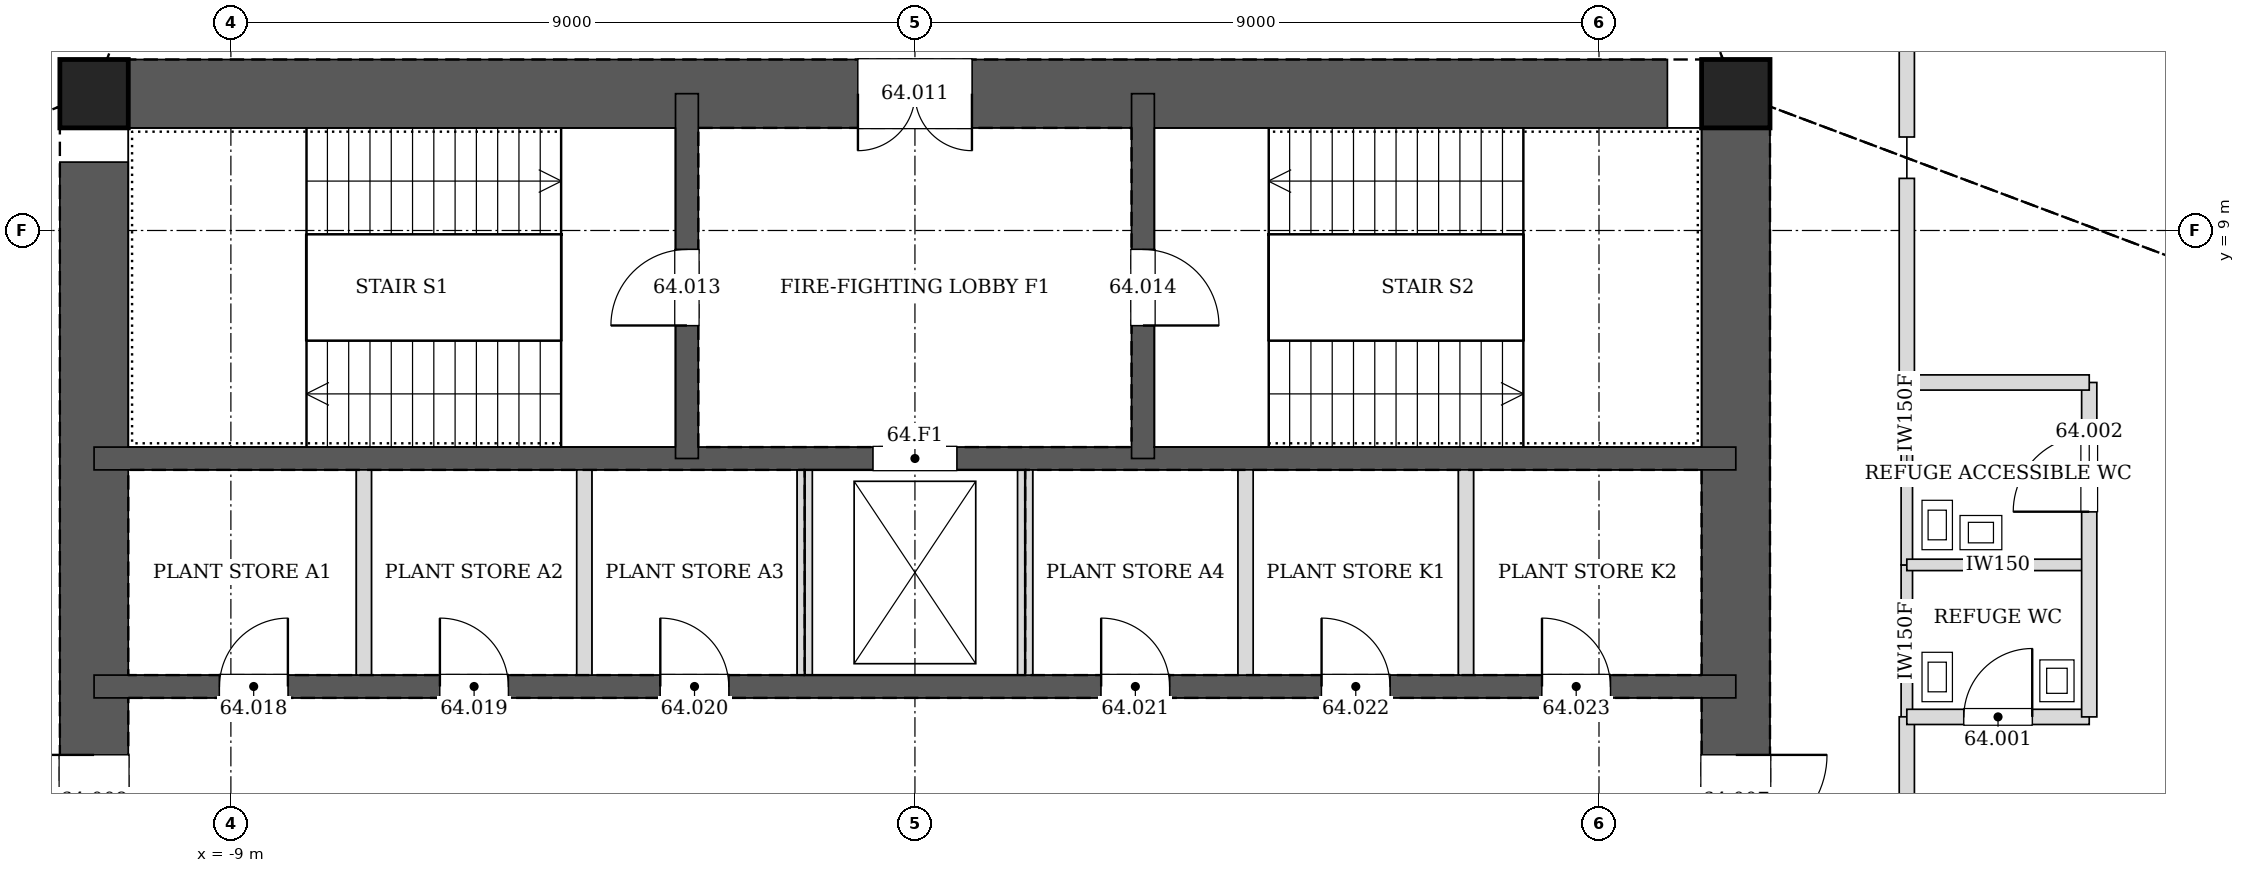
"""IFC4 building model, lengths in metres.
Left out: names, types, materials, properties, quantities, classifications, styles, units other than length and angle.
Written with IfcOpenShell. Run it as: python <this file> out.ifc"""

import sys

from ifc_helpers import new_model, si_unit, direction, frame, frame_2d, origin, origin_2d, place, context, subcontext, project, spatial, rectangle, hollow_rectangle, extrude, element, fill, save


model = new_model("IFC4")
c1 = context("Model", 3, precision=1e-05, world=origin(), true_north=direction((0.0, 1.0)))
c2 = subcontext(c1, "Body", "Model", "MODEL_VIEW")
j1 = project(units=[si_unit("LENGTHUNIT", "METRE"), si_unit("PLANEANGLEUNIT", "RADIAN")], contexts=[c1])
p1 = place(None, origin())
s1 = spatial("IfcSite", under=j1, at=p1, CompositionType="ELEMENT")
p2 = place(p1, origin())
s2 = spatial("IfcBuilding", under=s1, at=p2, CompositionType="ELEMENT")
p3 = place(p2, frame((0.0, 0.0, 266.3)))
s3 = spatial("IfcBuildingStorey", under=s2, at=p3, CompositionType="ELEMENT", Elevation=266.3)
for number, where, z_axis, x_axis in (
    (1, (10.8, 10.8, 0.0), (0.0, 0.0, 1.0), (1.0, 0.0, 0.0)),
    (2, (-10.8, 10.8, 0.0), (0.0, 0.0, 1.0), (1.0, 0.0, 0.0)),
):
    element("IfcColumn", number, at=place(p3, frame(where, z_axis=z_axis, x_axis=x_axis)), inside=s3, PredefinedType="COLUMN", context=c2, shape_type="SweptSolid", body=[
        extrude(hollow_rectangle(XDim=0.9, YDim=0.9, WallThickness=0.04, at=origin_2d()), origin(), (0.0, 0.0, 1.0), 4.5),
    ])
p4 = place(p3, frame((10.8, -10.8, 0.0), z_axis=(0.0, 0.0, 1.0), x_axis=(0.0, 1.0, 0.0)))
e3 = element("IfcWall", 3, at=p4, inside=s3, PredefinedType="SOLIDWALL", context=c2, shape_type="SweptSolid", body=[
    extrude(rectangle(XDim=21.6, YDim=0.9, at=frame_2d((10.8, 0.0))), origin(), (0.0, 0.0, 1.0), 4.5),
])
p5 = place(p4, frame((11.7, 0.0, 0.0)))
e4 = element("IfcOpeningElement", 4, at=p5, cuts=e3, PredefinedType="OPENING", context=c2, shape_type="SweptSolid", body=[
    extrude(rectangle(XDim=1.2, YDim=2.1, at=frame_2d((0.6, 1.05))), frame((0.0, 0.46, 0.0), z_axis=(0.0, -1.0, 0.0), x_axis=(1.0, 0.0, 0.0)), (0.0, 0.0, 1.0), 0.92),
])
p6 = place(p4, frame((8.7, 0.0, 0.0)))
e5 = element("IfcOpeningElement", 5, at=p6, cuts=e3, PredefinedType="OPENING", context=c2, shape_type="SweptSolid", body=[
    extrude(rectangle(XDim=1.2, YDim=2.1, at=frame_2d((0.6, 1.05))), frame((0.0, 0.46, 0.0), z_axis=(0.0, -1.0, 0.0), x_axis=(1.0, 0.0, 0.0)), (0.0, 0.0, 1.0), 0.92),
])
p7 = place(p3, frame((10.8, 10.8, 0.0), z_axis=(0.0, 0.0, 1.0), x_axis=(-1.0, 0.0, 0.0)))
e6 = element("IfcWall", 6, at=p7, inside=s3, PredefinedType="SOLIDWALL", context=c2, shape_type="SweptSolid", body=[
    extrude(rectangle(XDim=21.6, YDim=0.9, at=frame_2d((10.8, 0.0))), origin(), (0.0, 0.0, 1.0), 4.5),
])
p8 = place(p7, frame((10.05, 0.0, 0.0)))
e7 = element("IfcOpeningElement", 7, at=p8, cuts=e6, PredefinedType="OPENING", context=c2, shape_type="SweptSolid", body=[
    extrude(rectangle(XDim=1.5, YDim=2.1, at=frame_2d((0.75, 1.05))), frame((0.0, 0.46, 0.0), z_axis=(0.0, -1.0, 0.0), x_axis=(1.0, 0.0, 0.0)), (0.0, 0.0, 1.0), 0.92),
])
p9 = place(p3, frame((-10.8, 10.8, 0.0), z_axis=(0.0, 0.0, 1.0), x_axis=(0.0, -1.0, 0.0)))
e8 = element("IfcWall", 8, at=p9, inside=s3, PredefinedType="SOLIDWALL", context=c2, shape_type="SweptSolid", body=[
    extrude(rectangle(XDim=21.6, YDim=0.9, at=frame_2d((10.8, 0.0))), origin(), (0.0, 0.0, 1.0), 4.5),
])
p10 = place(p9, frame((8.7, 0.0, 0.0)))
e9 = element("IfcOpeningElement", 9, at=p10, cuts=e8, PredefinedType="OPENING", context=c2, shape_type="SweptSolid", body=[
    extrude(rectangle(XDim=1.2, YDim=2.1, at=frame_2d((0.6, 1.05))), frame((0.0, 0.46, 0.0), z_axis=(0.0, -1.0, 0.0), x_axis=(1.0, 0.0, 0.0)), (0.0, 0.0, 1.0), 0.92),
])
p11 = place(p9, frame((11.7, 0.0, 0.0)))
e10 = element("IfcOpeningElement", 10, at=p11, cuts=e8, PredefinedType="OPENING", context=c2, shape_type="SweptSolid", body=[
    extrude(rectangle(XDim=1.2, YDim=2.1, at=frame_2d((0.6, 1.05))), frame((0.0, 0.46, 0.0), z_axis=(0.0, -1.0, 0.0), x_axis=(1.0, 0.0, 0.0)), (0.0, 0.0, 1.0), 0.92),
])
p12 = place(p3, frame((-10.8, 3.0, 0.0), z_axis=(0.0, 0.0, 1.0), x_axis=(1.0, 0.0, 0.0)))
e11 = element("IfcWall", 11, at=p12, inside=s3, PredefinedType="SOLIDWALL", context=c2, shape_type="SweptSolid", body=[
    extrude(rectangle(XDim=21.6, YDim=0.3, at=frame_2d((10.8, 0.0))), origin(), (0.0, 0.0, 1.0), 4.5),
])
p13 = place(p12, frame((1.65, 0.0, 0.0)))
e12 = element("IfcOpeningElement", 12, at=p13, cuts=e11, PredefinedType="OPENING", context=c2, shape_type="SweptSolid", body=[
    extrude(rectangle(XDim=0.9, YDim=2.1, at=frame_2d((0.45, 1.05))), frame((0.0, 0.16, 0.0), z_axis=(0.0, -1.0, 0.0), x_axis=(1.0, 0.0, 0.0)), (0.0, 0.0, 1.0), 0.32),
])
p14 = place(p12, frame((4.55, 0.0, 0.0)))
e13 = element("IfcOpeningElement", 13, at=p14, cuts=e11, PredefinedType="OPENING", context=c2, shape_type="SweptSolid", body=[
    extrude(rectangle(XDim=0.9, YDim=2.1, at=frame_2d((0.45, 1.05))), frame((0.0, 0.16, 0.0), z_axis=(0.0, -1.0, 0.0), x_axis=(1.0, 0.0, 0.0)), (0.0, 0.0, 1.0), 0.32),
])
p15 = place(p12, frame((7.45, 0.0, 0.0)))
e14 = element("IfcOpeningElement", 14, at=p15, cuts=e11, PredefinedType="OPENING", context=c2, shape_type="SweptSolid", body=[
    extrude(rectangle(XDim=0.9, YDim=2.1, at=frame_2d((0.45, 1.05))), frame((0.0, 0.16, 0.0), z_axis=(0.0, -1.0, 0.0), x_axis=(1.0, 0.0, 0.0)), (0.0, 0.0, 1.0), 0.32),
])
p16 = place(p12, frame((13.25, 0.0, 0.0)))
e15 = element("IfcOpeningElement", 15, at=p16, cuts=e11, PredefinedType="OPENING", context=c2, shape_type="SweptSolid", body=[
    extrude(rectangle(XDim=0.9, YDim=2.1, at=frame_2d((0.45, 1.05))), frame((0.0, 0.16, 0.0), z_axis=(0.0, -1.0, 0.0), x_axis=(1.0, 0.0, 0.0)), (0.0, 0.0, 1.0), 0.32),
])
p17 = place(p12, frame((16.15, 0.0, 0.0)))
e16 = element("IfcOpeningElement", 16, at=p17, cuts=e11, PredefinedType="OPENING", context=c2, shape_type="SweptSolid", body=[
    extrude(rectangle(XDim=0.9, YDim=2.1, at=frame_2d((0.45, 1.05))), frame((0.0, 0.16, 0.0), z_axis=(0.0, -1.0, 0.0), x_axis=(1.0, 0.0, 0.0)), (0.0, 0.0, 1.0), 0.32),
])
p18 = place(p12, frame((19.05, 0.0, 0.0)))
e17 = element("IfcOpeningElement", 17, at=p18, cuts=e11, PredefinedType="OPENING", context=c2, shape_type="SweptSolid", body=[
    extrude(rectangle(XDim=0.9, YDim=2.1, at=frame_2d((0.45, 1.05))), frame((0.0, 0.16, 0.0), z_axis=(0.0, -1.0, 0.0), x_axis=(1.0, 0.0, 0.0)), (0.0, 0.0, 1.0), 0.32),
])
p19 = place(p3, frame((-10.8, 6.0, 0.0), z_axis=(0.0, 0.0, 1.0), x_axis=(1.0, 0.0, 0.0)))
e18 = element("IfcWall", 18, at=p19, inside=s3, PredefinedType="SOLIDWALL", context=c2, shape_type="SweptSolid", body=[
    extrude(rectangle(XDim=21.6, YDim=0.3, at=frame_2d((10.8, 0.0))), origin(), (0.0, 0.0, 1.0), 4.5),
])
p20 = place(p19, frame((10.25, 0.0, 0.0)))
e19 = element("IfcOpeningElement", 19, at=p20, cuts=e18, PredefinedType="OPENING", context=c2, shape_type="SweptSolid", body=[
    extrude(rectangle(XDim=1.1, YDim=2.1, at=frame_2d((0.55, 1.05))), frame((0.0, 0.16, 0.0), z_axis=(0.0, -1.0, 0.0), x_axis=(1.0, 0.0, 0.0)), (0.0, 0.0, 1.0), 0.32),
])
p21 = place(p3, frame((-3.0, 6.0, 0.0), z_axis=(0.0, 0.0, 1.0), x_axis=(0.0, 1.0, 0.0)))
e20 = element("IfcWall", 20, at=p21, inside=s3, PredefinedType="SOLIDWALL", context=c2, shape_type="SweptSolid", body=[
    extrude(rectangle(XDim=4.8, YDim=0.3, at=frame_2d((2.4, 0.0))), origin(), (0.0, 0.0, 1.0), 4.5),
])
p22 = place(p21, frame((1.75, 0.0, 0.0)))
e21 = element("IfcOpeningElement", 21, at=p22, cuts=e20, PredefinedType="OPENING", context=c2, shape_type="SweptSolid", body=[
    extrude(rectangle(XDim=1.0, YDim=2.1, at=frame_2d((0.5, 1.05))), frame((0.0, 0.16, 0.0), z_axis=(0.0, -1.0, 0.0), x_axis=(1.0, 0.0, 0.0)), (0.0, 0.0, 1.0), 0.32),
])
p23 = place(p3, frame((3.0, 6.0, 0.0), z_axis=(0.0, 0.0, 1.0), x_axis=(0.0, 1.0, 0.0)))
e22 = element("IfcWall", 22, at=p23, inside=s3, PredefinedType="SOLIDWALL", context=c2, shape_type="SweptSolid", body=[
    extrude(rectangle(XDim=4.8, YDim=0.3, at=frame_2d((2.4, 0.0))), origin(), (0.0, 0.0, 1.0), 4.5),
])
p24 = place(p23, frame((1.75, 0.0, 0.0)))
e23 = element("IfcOpeningElement", 23, at=p24, cuts=e22, PredefinedType="OPENING", context=c2, shape_type="SweptSolid", body=[
    extrude(rectangle(XDim=1.0, YDim=2.1, at=frame_2d((0.5, 1.05))), frame((0.0, 0.16, 0.0), z_axis=(0.0, -1.0, 0.0), x_axis=(1.0, 0.0, 0.0)), (0.0, 0.0, 1.0), 0.32),
])
p25 = place(p3, frame((13.05, 2.599, 0.0), z_axis=(0.0, 0.0, 1.0), x_axis=(0.0, 1.0, 0.0)))
e24 = element("IfcWall", 24, at=p25, inside=s3, PredefinedType="PARTITIONING", context=c2, shape_type="SweptSolid", body=[
    extrude(rectangle(XDim=2.002, YDim=0.15, at=frame_2d((1.001, 0.0))), origin(), (0.0, 0.0, 1.0), 4.3),
])
p26 = place(p3, frame((13.05, 4.599, 0.0), z_axis=(0.0, 0.0, 1.0), x_axis=(0.0, 1.0, 0.0)))
e25 = element("IfcWall", 25, at=p26, inside=s3, PredefinedType="PARTITIONING", context=c2, shape_type="SweptSolid", body=[
    extrude(rectangle(XDim=2.402, YDim=0.15, at=frame_2d((1.201, 0.0))), origin(), (0.0, 0.0, 1.0), 4.3),
])
p27 = place(p3, frame((13.05, -10.228, 0.0), z_axis=(0.0, 0.0, 1.0), x_axis=(0.0, 1.0, 0.0)))
e26 = element("IfcWall", 26, at=p27, inside=s3, PredefinedType="PARTITIONING", context=c2, shape_type="SweptSolid", body=[
    extrude(rectangle(XDim=12.829, YDim=0.2, at=frame_2d((6.415, 0.0))), origin(), (0.0, 0.0, 1.0), 3.363),
])
p28 = place(p27, frame((5.786, 0.0, 0.0)))
e27 = element("IfcOpeningElement", 27, at=p28, cuts=e26, PredefinedType="OPENING", context=c2, shape_type="SweptSolid", body=[
    extrude(rectangle(XDim=1.8, YDim=2.4, at=frame_2d((0.9, 1.2))), frame((0.0, 0.11, 0.0), z_axis=(0.0, -1.0, 0.0), x_axis=(1.0, 0.0, 0.0)), (0.0, 0.0, 1.0), 0.22),
])
p29 = place(p3, frame((13.05, 6.999, 0.0), z_axis=(0.0, 0.0, 1.0), x_axis=(0.0, 1.0, 0.0)))
e28 = element("IfcWall", 28, at=p29, inside=s3, PredefinedType="PARTITIONING", context=c2, shape_type="SweptSolid", body=[
    extrude(rectangle(XDim=2.687, YDim=0.2, at=frame_2d((1.343, 0.0))), origin(), (0.0, 0.0, 1.0), 3.49),
])
p30 = place(p3, frame((13.05, 10.23, 0.0), z_axis=(0.0, 0.0, 1.0), x_axis=(0.0, 1.0, 0.0)))
e29 = element("IfcWall", 29, at=p30, inside=s3, PredefinedType="PARTITIONING", context=c2, shape_type="SweptSolid", body=[
    extrude(rectangle(XDim=2.82, YDim=0.2, at=frame_2d((1.41, 0.0))), origin(), (0.0, 0.0, 1.0), 3.678),
])
p31 = place(p3, frame((15.45, 4.6, 0.0), z_axis=(0.0, 0.0, 1.0), x_axis=(-1.0, 0.0, 0.0)))
e30 = element("IfcWall", 30, at=p31, inside=s3, PredefinedType="PARTITIONING", context=c2, shape_type="SweptSolid", body=[
    extrude(rectangle(XDim=2.4, YDim=0.15, at=frame_2d((1.2, 0.0))), origin(), (0.0, 0.0, 1.0), 4.3),
])
p32 = place(p3, frame((13.05, 2.6, 0.0), z_axis=(0.0, 0.0, 1.0), x_axis=(1.0, 0.0, 0.0)))
e31 = element("IfcWall", 31, at=p32, inside=s3, PredefinedType="PARTITIONING", context=c2, shape_type="SweptSolid", body=[
    extrude(rectangle(XDim=2.4, YDim=0.2, at=frame_2d((1.2, 0.0))), origin(), (0.0, 0.0, 1.0), 4.3),
])
p33 = place(p32, frame((0.75, 0.0, 0.0)))
e32 = element("IfcOpeningElement", 32, at=p33, cuts=e31, PredefinedType="OPENING", context=c2, shape_type="SweptSolid", body=[
    extrude(rectangle(XDim=0.9, YDim=2.1, at=frame_2d((0.45, 1.05))), frame((0.0, 0.11, 0.0), z_axis=(0.0, -1.0, 0.0), x_axis=(1.0, 0.0, 0.0)), (0.0, 0.0, 1.0), 0.22),
])
p34 = place(p3, frame((15.45, 2.6, 0.0), z_axis=(0.0, 0.0, 1.0), x_axis=(0.0, 1.0, 0.0)))
e33 = element("IfcWall", 33, at=p34, inside=s3, PredefinedType="PARTITIONING", context=c2, shape_type="SweptSolid", body=[
    extrude(rectangle(XDim=4.4, YDim=0.2, at=frame_2d((2.2, 0.0))), origin(), (0.0, 0.0, 1.0), 4.3),
])
p35 = place(p34, frame((2.7, 0.0, 0.0)))
e34 = element("IfcOpeningElement", 34, at=p35, cuts=e33, PredefinedType="OPENING", context=c2, shape_type="SweptSolid", body=[
    extrude(rectangle(XDim=1.0, YDim=2.1, at=frame_2d((0.5, 1.05))), frame((0.0, 0.11, 0.0), z_axis=(0.0, -1.0, 0.0), x_axis=(1.0, 0.0, 0.0)), (0.0, 0.0, 1.0), 0.22),
])
p36 = place(p3, frame((15.45, 7.0, 0.0), z_axis=(0.0, 0.0, 1.0), x_axis=(-1.0, 0.0, 0.0)))
e35 = element("IfcWall", 35, at=p36, inside=s3, PredefinedType="PARTITIONING", context=c2, shape_type="SweptSolid", body=[
    extrude(rectangle(XDim=2.4, YDim=0.2, at=frame_2d((1.2, 0.0))), origin(), (0.0, 0.0, 1.0), 4.3),
])
for number, where, z_axis, x_axis in (
    (36, (-7.25, 3.15, 0.0), (0.0, 0.0, 1.0), (0.0, 1.0, 0.0)),
    (37, (-4.35, 3.15, 0.0), (0.0, 0.0, 1.0), (0.0, 1.0, 0.0)),
    (38, (-1.45, 3.15, 0.0), (0.0, 0.0, 1.0), (0.0, 1.0, 0.0)),
    (39, (1.45, 3.15, 0.0), (0.0, 0.0, 1.0), (0.0, 1.0, 0.0)),
    (40, (4.35, 3.15, 0.0), (0.0, 0.0, 1.0), (0.0, 1.0, 0.0)),
    (41, (7.25, 3.15, 0.0), (0.0, 0.0, 1.0), (0.0, 1.0, 0.0)),
):
    element("IfcWall", number, at=place(p3, frame(where, z_axis=z_axis, x_axis=x_axis)), inside=s3, PredefinedType="PARTITIONING", context=c2, shape_type="SweptSolid", body=[
        extrude(rectangle(XDim=2.7, YDim=0.2, at=frame_2d((1.35, 0.0))), origin(), (0.0, 0.0, 1.0), 4.3),
    ])
p37 = place(p33, origin())
e42 = element("IfcDoor", 42, at=p37, inside=s3, OperationType="SINGLE_SWING_RIGHT", PredefinedType="DOOR", context=c2, shape_type="SweptSolid", body=[
    extrude(rectangle(XDim=0.9, YDim=2.1, at=frame_2d((0.45, 1.05))), frame((0.0, 0.025, 0.0), z_axis=(0.0, -1.0, 0.0), x_axis=(1.0, 0.0, 0.0)), (0.0, 0.0, 1.0), 0.05),
])
fill(e32, e42)
p38 = place(p35, origin())
e43 = element("IfcDoor", 43, at=p38, inside=s3, OperationType="SINGLE_SWING_LEFT", PredefinedType="DOOR", context=c2, shape_type="SweptSolid", body=[
    extrude(rectangle(XDim=1.0, YDim=2.1, at=frame_2d((0.5, 1.05))), frame((0.0, 0.025, 0.0), z_axis=(0.0, -1.0, 0.0), x_axis=(1.0, 0.0, 0.0)), (0.0, 0.0, 1.0), 0.05),
])
fill(e34, e43)
p39 = place(p5, frame((1.2, 0.0, 0.0), z_axis=(0.0, 0.0, 1.0), x_axis=(-1.0, 0.0, 0.0)))
e44 = element("IfcDoor", 44, at=p39, inside=s3, OperationType="SINGLE_SWING_LEFT", PredefinedType="DOOR", context=c2, shape_type="SweptSolid", body=[
    extrude(rectangle(XDim=1.2, YDim=2.1, at=frame_2d((0.6, 1.05))), frame((0.0, 0.025, 0.0), z_axis=(0.0, -1.0, 0.0), x_axis=(1.0, 0.0, 0.0)), (0.0, 0.0, 1.0), 0.05),
])
fill(e4, e44)
p40 = place(p10, frame((1.2, 0.0, 0.0), z_axis=(0.0, 0.0, 1.0), x_axis=(-1.0, 0.0, 0.0)))
e45 = element("IfcDoor", 45, at=p40, inside=s3, OperationType="SINGLE_SWING_RIGHT", PredefinedType="DOOR", context=c2, shape_type="SweptSolid", body=[
    extrude(rectangle(XDim=1.2, YDim=2.1, at=frame_2d((0.6, 1.05))), frame((0.0, 0.025, 0.0), z_axis=(0.0, -1.0, 0.0), x_axis=(1.0, 0.0, 0.0)), (0.0, 0.0, 1.0), 0.05),
])
fill(e9, e45)
p41 = place(p8, origin())
e46 = element("IfcDoor", 46, at=p41, inside=s3, OperationType="DOUBLE_DOOR_SINGLE_SWING", PredefinedType="DOOR", context=c2, shape_type="SweptSolid", body=[
    extrude(rectangle(XDim=1.5, YDim=2.1, at=frame_2d((0.75, 1.05))), frame((0.0, 0.025, 0.0), z_axis=(0.0, -1.0, 0.0), x_axis=(1.0, 0.0, 0.0)), (0.0, 0.0, 1.0), 0.05),
])
fill(e7, e46)
p42 = place(p22, origin())
e47 = element("IfcDoor", 47, at=p42, inside=s3, OperationType="SINGLE_SWING_LEFT", PredefinedType="DOOR", context=c2, shape_type="SweptSolid", body=[
    extrude(rectangle(XDim=1.0, YDim=2.1, at=frame_2d((0.5, 1.05))), frame((0.0, 0.025, 0.0), z_axis=(0.0, -1.0, 0.0), x_axis=(1.0, 0.0, 0.0)), (0.0, 0.0, 1.0), 0.05),
])
fill(e21, e47)
p43 = place(p24, frame((1.0, 0.0, 0.0), z_axis=(0.0, 0.0, 1.0), x_axis=(-1.0, 0.0, 0.0)))
e48 = element("IfcDoor", 48, at=p43, inside=s3, OperationType="SINGLE_SWING_RIGHT", PredefinedType="DOOR", context=c2, shape_type="SweptSolid", body=[
    extrude(rectangle(XDim=1.0, YDim=2.1, at=frame_2d((0.5, 1.05))), frame((0.0, 0.025, 0.0), z_axis=(0.0, -1.0, 0.0), x_axis=(1.0, 0.0, 0.0)), (0.0, 0.0, 1.0), 0.05),
])
fill(e23, e48)
p44 = place(p13, origin())
e49 = element("IfcDoor", 49, at=p44, inside=s3, OperationType="SINGLE_SWING_RIGHT", PredefinedType="DOOR", context=c2, shape_type="SweptSolid", body=[
    extrude(rectangle(XDim=0.9, YDim=2.1, at=frame_2d((0.45, 1.05))), frame((0.0, 0.025, 0.0), z_axis=(0.0, -1.0, 0.0), x_axis=(1.0, 0.0, 0.0)), (0.0, 0.0, 1.0), 0.05),
])
fill(e12, e49)
p45 = place(p14, origin())
e50 = element("IfcDoor", 50, at=p45, inside=s3, OperationType="SINGLE_SWING_LEFT", PredefinedType="DOOR", context=c2, shape_type="SweptSolid", body=[
    extrude(rectangle(XDim=0.9, YDim=2.1, at=frame_2d((0.45, 1.05))), frame((0.0, 0.025, 0.0), z_axis=(0.0, -1.0, 0.0), x_axis=(1.0, 0.0, 0.0)), (0.0, 0.0, 1.0), 0.05),
])
fill(e13, e50)
p46 = place(p15, origin())
e51 = element("IfcDoor", 51, at=p46, inside=s3, OperationType="SINGLE_SWING_LEFT", PredefinedType="DOOR", context=c2, shape_type="SweptSolid", body=[
    extrude(rectangle(XDim=0.9, YDim=2.1, at=frame_2d((0.45, 1.05))), frame((0.0, 0.025, 0.0), z_axis=(0.0, -1.0, 0.0), x_axis=(1.0, 0.0, 0.0)), (0.0, 0.0, 1.0), 0.05),
])
fill(e14, e51)
p47 = place(p16, origin())
e52 = element("IfcDoor", 52, at=p47, inside=s3, OperationType="SINGLE_SWING_LEFT", PredefinedType="DOOR", context=c2, shape_type="SweptSolid", body=[
    extrude(rectangle(XDim=0.9, YDim=2.1, at=frame_2d((0.45, 1.05))), frame((0.0, 0.025, 0.0), z_axis=(0.0, -1.0, 0.0), x_axis=(1.0, 0.0, 0.0)), (0.0, 0.0, 1.0), 0.05),
])
fill(e15, e52)
p48 = place(p17, origin())
e53 = element("IfcDoor", 53, at=p48, inside=s3, OperationType="SINGLE_SWING_LEFT", PredefinedType="DOOR", context=c2, shape_type="SweptSolid", body=[
    extrude(rectangle(XDim=0.9, YDim=2.1, at=frame_2d((0.45, 1.05))), frame((0.0, 0.025, 0.0), z_axis=(0.0, -1.0, 0.0), x_axis=(1.0, 0.0, 0.0)), (0.0, 0.0, 1.0), 0.05),
])
fill(e16, e53)
p49 = place(p18, origin())
e54 = element("IfcDoor", 54, at=p49, inside=s3, OperationType="SINGLE_SWING_LEFT", PredefinedType="DOOR", context=c2, shape_type="SweptSolid", body=[
    extrude(rectangle(XDim=0.9, YDim=2.1, at=frame_2d((0.45, 1.05))), frame((0.0, 0.025, 0.0), z_axis=(0.0, -1.0, 0.0), x_axis=(1.0, 0.0, 0.0)), (0.0, 0.0, 1.0), 0.05),
])
fill(e17, e54)
p50 = place(p20, origin())
e55 = element("IfcDoor", 55, at=p50, inside=s3, OperationType="DOUBLE_DOOR_SLIDING", PredefinedType="DOOR", context=c2, shape_type="SweptSolid", body=[
    extrude(rectangle(XDim=1.1, YDim=2.1, at=frame_2d((0.55, 1.05))), frame((0.0, 0.025, 0.0), z_axis=(0.0, -1.0, 0.0), x_axis=(1.0, 0.0, 0.0)), (0.0, 0.0, 1.0), 0.05),
])
fill(e19, e55)
save(model, sys.argv[1])
